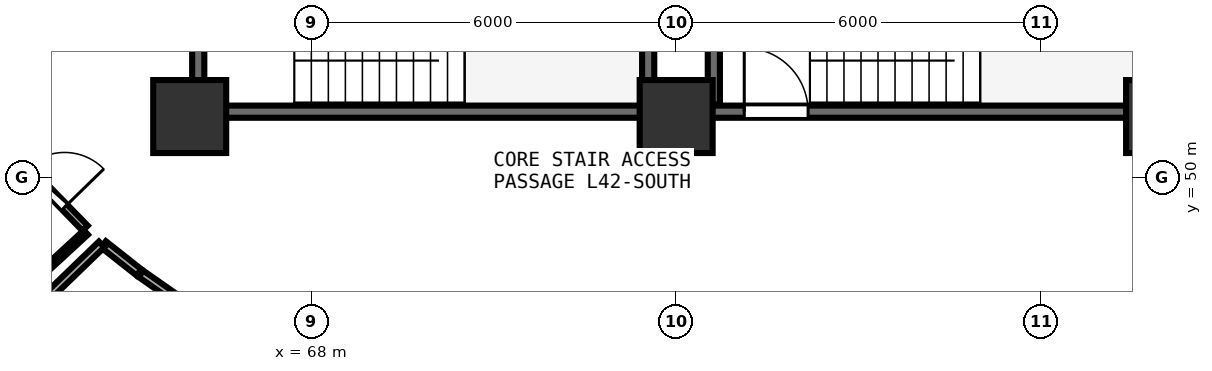
"""IFC4 building model, lengths in metres.
Left out: names, types, materials, properties, quantities, classifications, styles, units other than length and angle.
Written with IfcOpenShell. Run it as: python <this file> out.ifc"""

import sys

from ifc_helpers import new_model, si_unit, direction, frame, frame_2d, origin, origin_2d, place, context, subcontext, project, spatial, rectangle, extrude, element, fill, save


model = new_model("IFC4")
c1 = context("Model", 3, precision=1e-05, world=origin(), true_north=direction((0.0, 1.0)))
c2 = subcontext(c1, "Body", "Model", "MODEL_VIEW")
j1 = project(units=[si_unit("LENGTHUNIT", "METRE"), si_unit("PLANEANGLEUNIT", "RADIAN")], contexts=[c1])
p1 = place(None, origin())
s1 = spatial("IfcSite", under=j1, at=p1, CompositionType="ELEMENT")
p2 = place(p1, origin())
s2 = spatial("IfcBuilding", under=s1, at=p2, CompositionType="ELEMENT")
p3 = place(p2, frame((0.0, 0.0, 165.6)))
s3 = spatial("IfcBuildingStorey", under=s2, at=p3, CompositionType="ELEMENT", Elevation=165.6)
for number, where, z_axis, x_axis in (
    (1, (66.0, 51.0, 0.0), (0.0, 0.0, 1.0), (1.0, 0.0, 0.0)),
    (2, (74.0, 51.0, 0.0), (0.0, 0.0, 1.0), (1.0, 0.0, 0.0)),
    (3, (82.0, 51.0, 0.0), (0.0, 0.0, 1.0), (1.0, 0.0, 0.0)),
):
    element("IfcColumn", number, at=place(p3, frame(where, z_axis=z_axis, x_axis=x_axis)), inside=s3, PredefinedType="PILASTER", context=c2, shape_type="SweptSolid", body=[
        extrude(rectangle(XDim=1.2, YDim=1.2, at=origin_2d()), origin(), (0.0, 0.0, 1.0), 3.75),
    ])
p4 = place(p3, frame((74.0, 51.08, 0.0), z_axis=(0.0, 0.0, 1.0), x_axis=(1.0, 0.0, 0.0)))
e4 = element("IfcWall", 4, at=p4, inside=s3, PredefinedType="SHEAR", context=c2, shape_type="SweptSolid", body=[
    extrude(rectangle(XDim=7.9, YDim=0.2, at=frame_2d((3.95, 0.0))), origin(), (0.0, 0.0, 1.0), 3.49),
])
p5 = place(p4, frame((1.12, 0.0, 0.0)))
e5 = element("IfcOpeningElement", 5, at=p5, cuts=e4, PredefinedType="OPENING", context=c2, shape_type="SweptSolid", body=[
    extrude(rectangle(XDim=1.05, YDim=2.1, at=frame_2d((0.525, 1.05))), frame((0.0, 0.11, 0.0), z_axis=(0.0, -1.0, 0.0), x_axis=(1.0, 0.0, 0.0)), (0.0, 0.0, 1.0), 0.22),
])
p6 = place(p3, frame((74.62, 54.27, 0.0), z_axis=(0.0, 0.0, 1.0), x_axis=(0.0, -1.0, 0.0)))
e6 = element("IfcWall", 6, at=p6, inside=s3, PredefinedType="SHEAR", context=c2, shape_type="SweptSolid", body=[
    extrude(rectangle(XDim=3.07, YDim=0.2, at=frame_2d((1.535, 0.0))), origin(), (0.0, 0.0, 1.0), 3.49),
])
p7 = place(p3, frame((66.26, 51.08, 0.0), z_axis=(0.0, 0.0, 1.0), x_axis=(1.0, 0.0, 0.0)))
e7 = element("IfcWall", 7, at=p7, inside=s3, PredefinedType="SHEAR", context=c2, shape_type="SweptSolid", body=[
    extrude(rectangle(XDim=7.16, YDim=0.2, at=frame_2d((3.58, 0.0))), origin(), (0.0, 0.0, 1.0), 3.49),
])
p8 = place(p3, frame((73.54, 51.2, 0.0), z_axis=(0.0, 0.0, 1.0), x_axis=(0.0, 1.0, 0.0)))
e8 = element("IfcWall", 8, at=p8, inside=s3, PredefinedType="SHEAR", context=c2, shape_type="SweptSolid", body=[
    extrude(rectangle(XDim=3.07, YDim=0.2, at=frame_2d((1.535, 0.0))), origin(), (0.0, 0.0, 1.0), 3.49),
])
p9 = place(p3, frame((66.14, 54.27, 0.0), z_axis=(0.0, 0.0, 1.0), x_axis=(0.0, -1.0, 0.0)))
e9 = element("IfcWall", 9, at=p9, inside=s3, PredefinedType="SHEAR", context=c2, shape_type="SweptSolid", body=[
    extrude(rectangle(XDim=3.07, YDim=0.2, at=frame_2d((1.535, 0.0))), origin(), (0.0, 0.0, 1.0), 3.49),
])
p10 = place(p9, frame((1.01, 0.0, 0.0)))
e10 = element("IfcOpeningElement", 10, at=p10, cuts=e9, PredefinedType="OPENING", context=c2, shape_type="SweptSolid", body=[
    extrude(rectangle(XDim=1.05, YDim=2.1, at=frame_2d((0.525, 1.05))), frame((0.0, 0.11, 0.0), z_axis=(0.0, -1.0, 0.0), x_axis=(1.0, 0.0, 0.0)), (0.0, 0.0, 1.0), 0.22),
])
p11 = place(p3, frame((62.977, 50.5, 0.0), z_axis=(0.0, 0.0, 1.0), x_axis=(0.69801962686, -0.71607862733, 0.0)))
e11 = element("IfcWall", 11, at=p11, inside=s3, PredefinedType="PARTITIONING", context=c2, shape_type="SweptSolid", body=[
    extrude(rectangle(XDim=1.866, YDim=0.12, at=frame_2d((0.933, 0.0))), origin(), (0.0, 0.0, 1.0), 2.975),
])
p12 = place(p11, frame((0.483, 0.0, 0.0)))
e12 = element("IfcOpeningElement", 12, at=p12, cuts=e11, PredefinedType="OPENING", context=c2, shape_type="SweptSolid", body=[
    extrude(rectangle(XDim=0.9, YDim=2.08, at=frame_2d((0.45, 1.04))), frame((0.0, 0.07, 0.0), z_axis=(0.0, -1.0, 0.0), x_axis=(1.0, 0.0, 0.0)), (0.0, 0.0, 1.0), 0.14),
])
p13 = place(p3, frame((64.292, 49.094, 0.0), z_axis=(0.0, 0.0, 1.0), x_axis=(-0.73529828134, -0.677743636973, 0.0)))
e13 = element("IfcWall", 13, at=p13, inside=s3, PredefinedType="PARTITIONING", context=c2, shape_type="SweptSolid", body=[
    extrude(rectangle(XDim=7.771, YDim=0.1, at=frame_2d((3.886, 0.0))), origin(), (0.0, 0.0, 1.0), 3.025),
])
p14 = place(p3, frame((64.581, 48.899, 0.0), z_axis=(0.0, 0.0, 1.0), x_axis=(0.785042223167, -0.619442255456, 0.0)))
e14 = element("IfcWall", 14, at=p14, inside=s3, PredefinedType="PLUMBINGWALL", context=c2, shape_type="SweptSolid", body=[
    extrude(rectangle(XDim=0.745, YDim=0.13, at=frame_2d((0.372, 0.0))), origin(), (0.0, 0.0, 1.0), 2.975),
])
p15 = place(p3, frame((65.198, 48.414, 0.0), z_axis=(0.0, 0.0, 1.0), x_axis=(0.819339212877, -0.573309039038, 0.0)))
e15 = element("IfcWall", 15, at=p15, inside=s3, PredefinedType="PLUMBINGWALL", context=c2, shape_type="SweptSolid", body=[
    extrude(rectangle(XDim=0.748, YDim=0.13, at=frame_2d((0.374, 0.0))), origin(), (0.0, 0.0, 1.0), 2.975),
])
p16 = place(p3, frame((62.581, 46.994, 0.0), z_axis=(0.0, 0.0, 1.0), x_axis=(0.719038860306, 0.694969867958, 0.0)))
e16 = element("IfcWall", 16, at=p16, inside=s3, PredefinedType="PLUMBINGWALL", context=c2, shape_type="SweptSolid", body=[
    extrude(rectangle(XDim=2.739, YDim=0.13, at=frame_2d((1.369, 0.0))), origin(), (0.0, 0.0, 1.0), 3.235),
])
p17 = place(p5, origin())
e17 = element("IfcDoor", 17, at=p17, inside=s3, OperationType="SINGLE_SWING_LEFT", PredefinedType="DOOR", context=c2, shape_type="SweptSolid", body=[
    extrude(rectangle(XDim=1.05, YDim=2.1, at=frame_2d((0.525, 1.05))), frame((0.0, 0.025, 0.0), z_axis=(0.0, -1.0, 0.0), x_axis=(1.0, 0.0, 0.0)), (0.0, 0.0, 1.0), 0.05),
])
fill(e5, e17)
p18 = place(p12, origin())
e18 = element("IfcDoor", 18, at=p18, inside=s3, OperationType="SINGLE_SWING_RIGHT", PredefinedType="DOOR", context=c2, shape_type="SweptSolid", body=[
    extrude(rectangle(XDim=0.9, YDim=2.08, at=frame_2d((0.45, 1.04))), frame((0.0, 0.025, 0.0), z_axis=(0.0, -1.0, 0.0), x_axis=(1.0, 0.0, 0.0)), (0.0, 0.0, 1.0), 0.05),
])
fill(e12, e18)
save(model, sys.argv[1])
